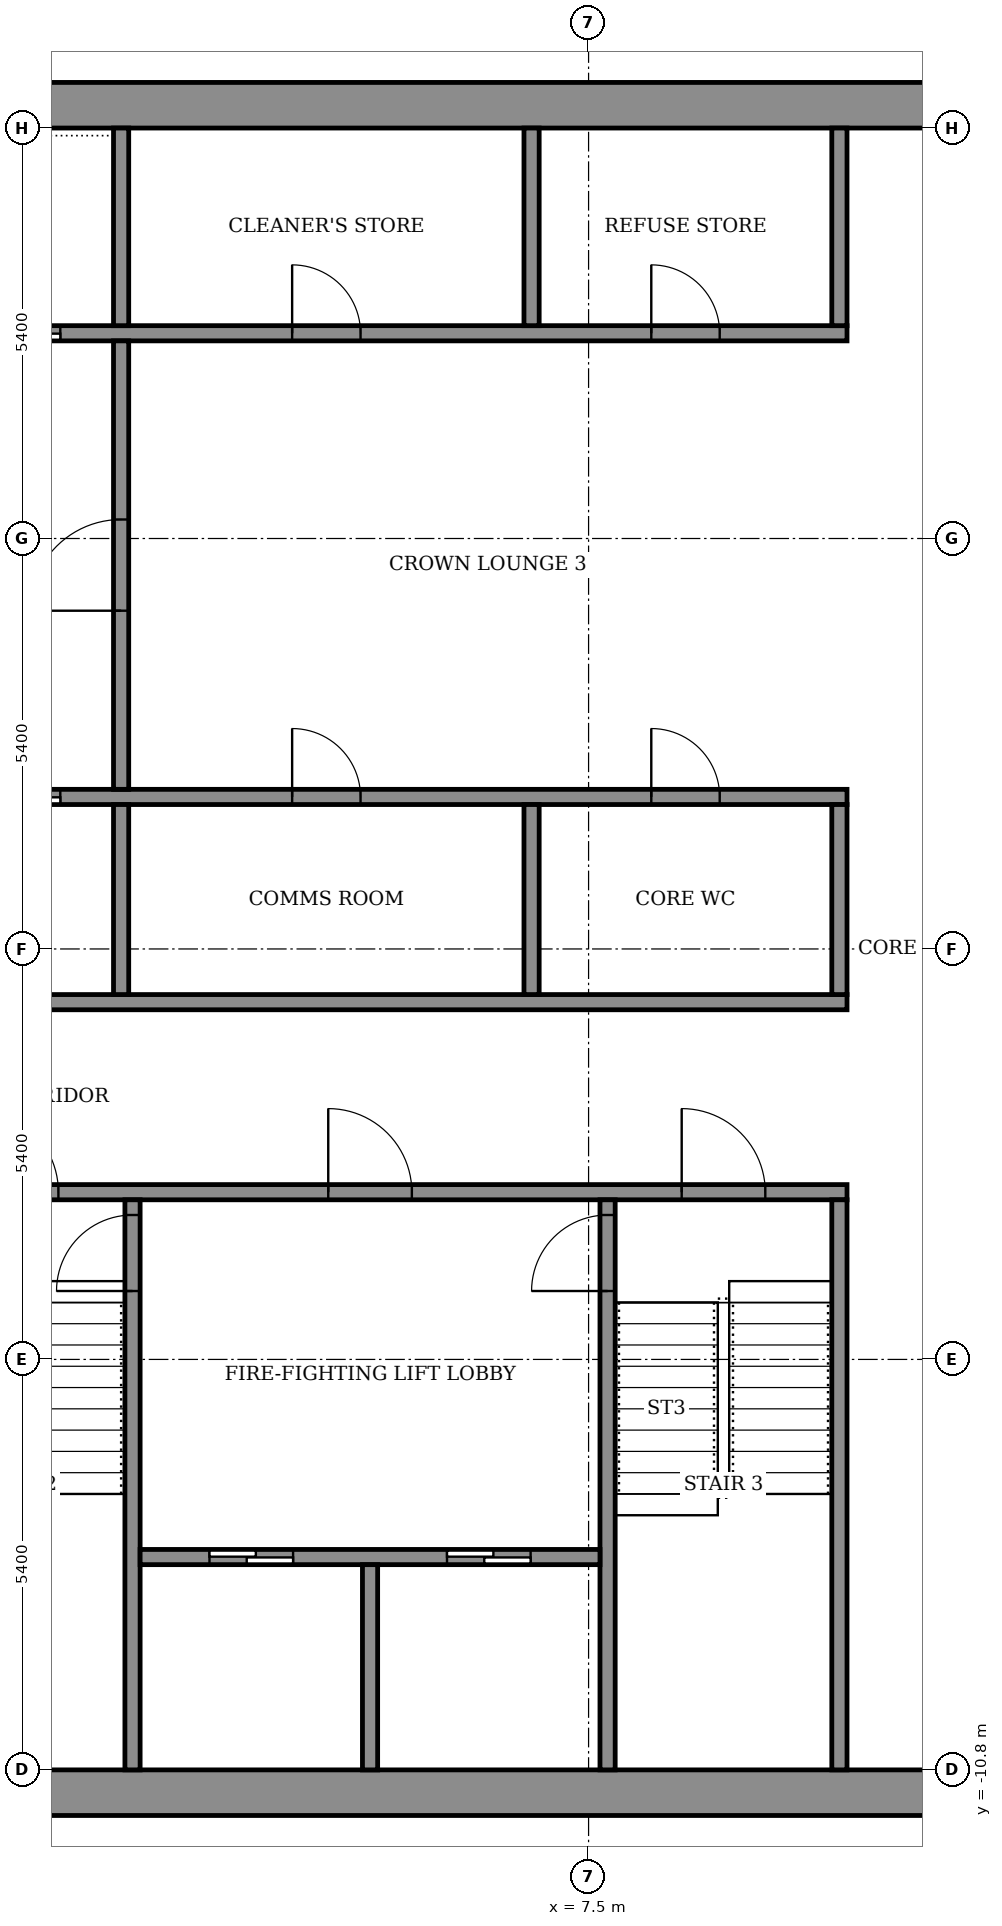
"""IFC4 building model, lengths in metres.
Left out: names, types, materials, properties, quantities, classifications, styles, units other than length and angle.
Written with IfcOpenShell. Run it as: python <this file> out.ifc"""

import sys

from ifc_helpers import new_model, si_unit, direction, frame, frame_2d, origin, place, context, subcontext, project, spatial, rectangle, extrude, element, fill, save


model = new_model("IFC4")
c1 = context("Model", 3, precision=1e-05, world=origin(), true_north=direction((0.0, 1.0)))
c2 = subcontext(c1, "Body", "Model", "MODEL_VIEW")
j1 = project(units=[si_unit("LENGTHUNIT", "METRE"), si_unit("PLANEANGLEUNIT", "RADIAN")], contexts=[c1])
p1 = place(None, origin())
s1 = spatial("IfcSite", under=j1, at=p1, CompositionType="ELEMENT")
p2 = place(p1, origin())
s2 = spatial("IfcBuilding", under=s1, at=p2, CompositionType="ELEMENT")
p3 = place(p2, frame((0.0, 0.0, 334.3)))
s3 = spatial("IfcBuildingStorey", under=s2, at=p3, CompositionType="ELEMENT", Elevation=334.3)
for number, where, z_axis, x_axis in (
    (1, (-14.4, -11.1, 0.0), (0.0, 0.0, 1.0), (1.0, 0.0, 0.0)),
    (2, (-14.4, 11.1, 0.0), (0.0, 0.0, 1.0), (1.0, 0.0, 0.0)),
):
    element("IfcWall", number, at=place(p3, frame(where, z_axis=z_axis, x_axis=x_axis)), inside=s3, PredefinedType="SHEAR", context=c2, shape_type="SweptSolid", body=[
        extrude(rectangle(XDim=28.8, YDim=0.6, at=frame_2d((14.4, 0.0))), origin(), (0.0, 0.0, 1.0), 3.6),
    ])
p4 = place(p3, frame((-10.9, -3.2, 0.0), z_axis=(0.0, 0.0, 1.0), x_axis=(1.0, 0.0, 0.0)))
e3 = element("IfcWall", 3, at=p4, inside=s3, PredefinedType="SHEAR", context=c2, shape_type="SweptSolid", body=[
    extrude(rectangle(XDim=21.8, YDim=0.2, at=frame_2d((10.9, 0.0))), origin(), (0.0, 0.0, 1.0), 3.05),
])
p5 = place(p4, frame((1.075, 0.0, 0.0)))
e4 = element("IfcOpeningElement", 4, at=p5, cuts=e3, PredefinedType="OPENING", context=c2, shape_type="SweptSolid", body=[
    extrude(rectangle(XDim=1.1, YDim=2.1, at=frame_2d((0.55, 1.05))), frame((0.0, 0.11, 0.0), z_axis=(0.0, -1.0, 0.0), x_axis=(1.0, 0.0, 0.0)), (0.0, 0.0, 1.0), 0.22),
])
p6 = place(p4, frame((10.325, 0.0, 0.0)))
e5 = element("IfcOpeningElement", 5, at=p6, cuts=e3, PredefinedType="OPENING", context=c2, shape_type="SweptSolid", body=[
    extrude(rectangle(XDim=1.1, YDim=2.1, at=frame_2d((0.55, 1.05))), frame((0.0, 0.11, 0.0), z_axis=(0.0, -1.0, 0.0), x_axis=(1.0, 0.0, 0.0)), (0.0, 0.0, 1.0), 0.22),
])
p7 = place(p4, frame((19.625, 0.0, 0.0)))
e6 = element("IfcOpeningElement", 6, at=p7, cuts=e3, PredefinedType="OPENING", context=c2, shape_type="SweptSolid", body=[
    extrude(rectangle(XDim=1.1, YDim=2.1, at=frame_2d((0.55, 1.05))), frame((0.0, 0.11, 0.0), z_axis=(0.0, -1.0, 0.0), x_axis=(1.0, 0.0, 0.0)), (0.0, 0.0, 1.0), 0.22),
])
p8 = place(p4, frame((5.7, 0.0, 0.0)))
e7 = element("IfcOpeningElement", 7, at=p8, cuts=e3, PredefinedType="OPENING", context=c2, shape_type="SweptSolid", body=[
    extrude(rectangle(XDim=1.1, YDim=2.1, at=frame_2d((0.55, 1.05))), frame((0.0, 0.11, 0.0), z_axis=(0.0, -1.0, 0.0), x_axis=(1.0, 0.0, 0.0)), (0.0, 0.0, 1.0), 0.22),
])
p9 = place(p4, frame((14.975, 0.0, 0.0)))
e8 = element("IfcOpeningElement", 8, at=p9, cuts=e3, PredefinedType="OPENING", context=c2, shape_type="SweptSolid", body=[
    extrude(rectangle(XDim=1.1, YDim=2.1, at=frame_2d((0.55, 1.05))), frame((0.0, 0.11, 0.0), z_axis=(0.0, -1.0, 0.0), x_axis=(1.0, 0.0, 0.0)), (0.0, 0.0, 1.0), 0.22),
])
p10 = place(p3, frame((-10.9, -0.7, 0.0), z_axis=(0.0, 0.0, 1.0), x_axis=(1.0, 0.0, 0.0)))
e9 = element("IfcWall", 9, at=p10, inside=s3, PredefinedType="SHEAR", context=c2, shape_type="SweptSolid", body=[
    extrude(rectangle(XDim=21.8, YDim=0.2, at=frame_2d((10.9, 0.0))), origin(), (0.0, 0.0, 1.0), 3.05),
])
p11 = place(p3, frame((-10.9, 2.0, 0.0), z_axis=(0.0, 0.0, 1.0), x_axis=(1.0, 0.0, 0.0)))
e10 = element("IfcWall", 10, at=p11, inside=s3, PredefinedType="SHEAR", context=c2, shape_type="SweptSolid", body=[
    extrude(rectangle(XDim=21.8, YDim=0.2, at=frame_2d((10.9, 0.0))), origin(), (0.0, 0.0, 1.0), 3.05),
])
p12 = place(p11, frame((4.95, 0.0, 0.0)))
e11 = element("IfcOpeningElement", 11, at=p12, cuts=e10, PredefinedType="OPENING", context=c2, shape_type="SweptSolid", body=[
    extrude(rectangle(XDim=1.1, YDim=2.1, at=frame_2d((0.55, 1.05))), frame((0.0, 0.11, 0.0), z_axis=(0.0, -1.0, 0.0), x_axis=(1.0, 0.0, 0.0)), (0.0, 0.0, 1.0), 0.22),
])
p13 = place(p11, frame((7.65, 0.0, 0.0)))
e12 = element("IfcOpeningElement", 12, at=p13, cuts=e10, PredefinedType="OPENING", context=c2, shape_type="SweptSolid", body=[
    extrude(rectangle(XDim=1.1, YDim=2.1, at=frame_2d((0.55, 1.05))), frame((0.0, 0.11, 0.0), z_axis=(0.0, -1.0, 0.0), x_axis=(1.0, 0.0, 0.0)), (0.0, 0.0, 1.0), 0.22),
])
p14 = place(p11, frame((10.35, 0.0, 0.0)))
e13 = element("IfcOpeningElement", 13, at=p14, cuts=e10, PredefinedType="OPENING", context=c2, shape_type="SweptSolid", body=[
    extrude(rectangle(XDim=1.1, YDim=2.1, at=frame_2d((0.55, 1.05))), frame((0.0, 0.11, 0.0), z_axis=(0.0, -1.0, 0.0), x_axis=(1.0, 0.0, 0.0)), (0.0, 0.0, 1.0), 0.22),
])
p15 = place(p11, frame((1.675, 0.0, 0.0)))
e14 = element("IfcOpeningElement", 14, at=p15, cuts=e10, PredefinedType="OPENING", context=c2, shape_type="SweptSolid", body=[
    extrude(rectangle(XDim=0.9, YDim=2.1, at=frame_2d((0.45, 1.05))), frame((0.0, 0.11, 0.0), z_axis=(0.0, -1.0, 0.0), x_axis=(1.0, 0.0, 0.0)), (0.0, 0.0, 1.0), 0.22),
])
p16 = place(p11, frame((14.5, 0.0, 0.0)))
e15 = element("IfcOpeningElement", 15, at=p16, cuts=e10, PredefinedType="OPENING", context=c2, shape_type="SweptSolid", body=[
    extrude(rectangle(XDim=0.9, YDim=2.1, at=frame_2d((0.45, 1.05))), frame((0.0, 0.11, 0.0), z_axis=(0.0, -1.0, 0.0), x_axis=(1.0, 0.0, 0.0)), (0.0, 0.0, 1.0), 0.22),
])
p17 = place(p11, frame((19.225, 0.0, 0.0)))
e16 = element("IfcOpeningElement", 16, at=p17, cuts=e10, PredefinedType="OPENING", context=c2, shape_type="SweptSolid", body=[
    extrude(rectangle(XDim=0.9, YDim=2.1, at=frame_2d((0.45, 1.05))), frame((0.0, 0.11, 0.0), z_axis=(0.0, -1.0, 0.0), x_axis=(1.0, 0.0, 0.0)), (0.0, 0.0, 1.0), 0.22),
])
p18 = place(p3, frame((-10.9, 8.1, 0.0), z_axis=(0.0, 0.0, 1.0), x_axis=(1.0, 0.0, 0.0)))
e17 = element("IfcWall", 17, at=p18, inside=s3, PredefinedType="SHEAR", context=c2, shape_type="SweptSolid", body=[
    extrude(rectangle(XDim=21.8, YDim=0.2, at=frame_2d((10.9, 0.0))), origin(), (0.0, 0.0, 1.0), 3.05),
])
p19 = place(p18, frame((4.95, 0.0, 0.0)))
e18 = element("IfcOpeningElement", 18, at=p19, cuts=e17, PredefinedType="OPENING", context=c2, shape_type="SweptSolid", body=[
    extrude(rectangle(XDim=1.1, YDim=2.1, at=frame_2d((0.55, 1.05))), frame((0.0, 0.11, 0.0), z_axis=(0.0, -1.0, 0.0), x_axis=(1.0, 0.0, 0.0)), (0.0, 0.0, 1.0), 0.22),
])
p20 = place(p18, frame((7.65, 0.0, 0.0)))
e19 = element("IfcOpeningElement", 19, at=p20, cuts=e17, PredefinedType="OPENING", context=c2, shape_type="SweptSolid", body=[
    extrude(rectangle(XDim=1.1, YDim=2.1, at=frame_2d((0.55, 1.05))), frame((0.0, 0.11, 0.0), z_axis=(0.0, -1.0, 0.0), x_axis=(1.0, 0.0, 0.0)), (0.0, 0.0, 1.0), 0.22),
])
p21 = place(p18, frame((10.35, 0.0, 0.0)))
e20 = element("IfcOpeningElement", 20, at=p21, cuts=e17, PredefinedType="OPENING", context=c2, shape_type="SweptSolid", body=[
    extrude(rectangle(XDim=1.1, YDim=2.1, at=frame_2d((0.55, 1.05))), frame((0.0, 0.11, 0.0), z_axis=(0.0, -1.0, 0.0), x_axis=(1.0, 0.0, 0.0)), (0.0, 0.0, 1.0), 0.22),
])
p22 = place(p18, frame((1.675, 0.0, 0.0)))
e21 = element("IfcOpeningElement", 21, at=p22, cuts=e17, PredefinedType="OPENING", context=c2, shape_type="SweptSolid", body=[
    extrude(rectangle(XDim=0.9, YDim=2.1, at=frame_2d((0.45, 1.05))), frame((0.0, 0.11, 0.0), z_axis=(0.0, -1.0, 0.0), x_axis=(1.0, 0.0, 0.0)), (0.0, 0.0, 1.0), 0.22),
])
p23 = place(p18, frame((14.5, 0.0, 0.0)))
e22 = element("IfcOpeningElement", 22, at=p23, cuts=e17, PredefinedType="OPENING", context=c2, shape_type="SweptSolid", body=[
    extrude(rectangle(XDim=0.9, YDim=2.1, at=frame_2d((0.45, 1.05))), frame((0.0, 0.11, 0.0), z_axis=(0.0, -1.0, 0.0), x_axis=(1.0, 0.0, 0.0)), (0.0, 0.0, 1.0), 0.22),
])
p24 = place(p18, frame((19.225, 0.0, 0.0)))
e23 = element("IfcOpeningElement", 23, at=p24, cuts=e17, PredefinedType="OPENING", context=c2, shape_type="SweptSolid", body=[
    extrude(rectangle(XDim=0.9, YDim=2.1, at=frame_2d((0.45, 1.05))), frame((0.0, 0.11, 0.0), z_axis=(0.0, -1.0, 0.0), x_axis=(1.0, 0.0, 0.0)), (0.0, 0.0, 1.0), 0.22),
])
p25 = place(p3, frame((1.5, -10.8, 0.0), z_axis=(0.0, 0.0, 1.0), x_axis=(0.0, 1.0, 0.0)))
e24 = element("IfcWall", 24, at=p25, inside=s3, PredefinedType="SHEAR", context=c2, shape_type="SweptSolid", body=[
    extrude(rectangle(XDim=7.5, YDim=0.2, at=frame_2d((3.75, 0.0))), origin(), (0.0, 0.0, 1.0), 3.05),
])
p26 = place(p25, frame((6.3, 0.0, 0.0)))
e25 = element("IfcOpeningElement", 25, at=p26, cuts=e24, PredefinedType="OPENING", context=c2, shape_type="SweptSolid", body=[
    extrude(rectangle(XDim=1.0, YDim=2.1, at=frame_2d((0.5, 1.05))), frame((0.0, 0.11, 0.0), z_axis=(0.0, -1.0, 0.0), x_axis=(1.0, 0.0, 0.0)), (0.0, 0.0, 1.0), 0.22),
])
p27 = place(p3, frame((7.75, -10.8, 0.0), z_axis=(0.0, 0.0, 1.0), x_axis=(0.0, 1.0, 0.0)))
e26 = element("IfcWall", 26, at=p27, inside=s3, PredefinedType="SHEAR", context=c2, shape_type="SweptSolid", body=[
    extrude(rectangle(XDim=7.5, YDim=0.2, at=frame_2d((3.75, 0.0))), origin(), (0.0, 0.0, 1.0), 3.05),
])
p28 = place(p27, frame((6.3, 0.0, 0.0)))
e27 = element("IfcOpeningElement", 27, at=p28, cuts=e26, PredefinedType="OPENING", context=c2, shape_type="SweptSolid", body=[
    extrude(rectangle(XDim=1.0, YDim=2.1, at=frame_2d((0.5, 1.05))), frame((0.0, 0.11, 0.0), z_axis=(0.0, -1.0, 0.0), x_axis=(1.0, 0.0, 0.0)), (0.0, 0.0, 1.0), 0.22),
])
p29 = place(p3, frame((10.8, -10.8, 0.0), z_axis=(0.0, 0.0, 1.0), x_axis=(0.0, 1.0, 0.0)))
e28 = element("IfcWall", 28, at=p29, inside=s3, PredefinedType="SHEAR", context=c2, shape_type="SweptSolid", body=[
    extrude(rectangle(XDim=7.5, YDim=0.2, at=frame_2d((3.75, 0.0))), origin(), (0.0, 0.0, 1.0), 3.05),
])
p30 = place(p3, frame((1.6, -8.0, 0.0), z_axis=(0.0, 0.0, 1.0), x_axis=(1.0, 0.0, 0.0)))
e29 = element("IfcWall", 29, at=p30, inside=s3, PredefinedType="SHEAR", context=c2, shape_type="SweptSolid", body=[
    extrude(rectangle(XDim=6.05, YDim=0.2, at=frame_2d((3.025, 0.0))), origin(), (0.0, 0.0, 1.0), 3.05),
])
p31 = place(p30, frame((0.913, 0.0, 0.0)))
e30 = element("IfcOpeningElement", 30, at=p31, cuts=e29, PredefinedType="OPENING", context=c2, shape_type="SweptSolid", body=[
    extrude(rectangle(XDim=1.1, YDim=2.1, at=frame_2d((0.55, 1.05))), frame((0.0, 0.11, 0.0), z_axis=(0.0, -1.0, 0.0), x_axis=(1.0, 0.0, 0.0)), (0.0, 0.0, 1.0), 0.22),
])
p32 = place(p30, frame((4.038, 0.0, 0.0)))
e31 = element("IfcOpeningElement", 31, at=p32, cuts=e29, PredefinedType="OPENING", context=c2, shape_type="SweptSolid", body=[
    extrude(rectangle(XDim=1.1, YDim=2.1, at=frame_2d((0.55, 1.05))), frame((0.0, 0.11, 0.0), z_axis=(0.0, -1.0, 0.0), x_axis=(1.0, 0.0, 0.0)), (0.0, 0.0, 1.0), 0.22),
])
p33 = place(p3, frame((4.625, -10.8, 0.0), z_axis=(0.0, 0.0, 1.0), x_axis=(0.0, 1.0, 0.0)))
e32 = element("IfcWall", 32, at=p33, inside=s3, PredefinedType="SHEAR", context=c2, shape_type="SweptSolid", body=[
    extrude(rectangle(XDim=2.7, YDim=0.2, at=frame_2d((1.35, 0.0))), origin(), (0.0, 0.0, 1.0), 3.05),
])
p34 = place(p3, frame((1.35, -0.6, 0.0), z_axis=(0.0, 0.0, 1.0), x_axis=(0.0, 1.0, 0.0)))
e33 = element("IfcWall", 33, at=p34, inside=s3, PredefinedType="SHEAR", context=c2, shape_type="SweptSolid", body=[
    extrude(rectangle(XDim=2.5, YDim=0.2, at=frame_2d((1.25, 0.0))), origin(), (0.0, 0.0, 1.0), 3.05),
])
for number, where, z_axis, x_axis in (
    (34, (6.75, -0.6, 0.0), (0.0, 0.0, 1.0), (0.0, 1.0, 0.0)),
    (35, (10.8, -0.6, 0.0), (0.0, 0.0, 1.0), (0.0, 1.0, 0.0)),
):
    element("IfcWall", number, at=place(p3, frame(where, z_axis=z_axis, x_axis=x_axis)), inside=s3, PredefinedType="STANDARD", context=c2, shape_type="SweptSolid", body=[
        extrude(rectangle(XDim=2.5, YDim=0.2, at=frame_2d((1.25, 0.0))), origin(), (0.0, 0.0, 1.0), 3.05),
    ])
p35 = place(p3, frame((1.35, 8.2, 0.0), z_axis=(0.0, 0.0, 1.0), x_axis=(0.0, 1.0, 0.0)))
e36 = element("IfcWall", 36, at=p35, inside=s3, PredefinedType="SHEAR", context=c2, shape_type="SweptSolid", body=[
    extrude(rectangle(XDim=2.6, YDim=0.2, at=frame_2d((1.3, 0.0))), origin(), (0.0, 0.0, 1.0), 3.05),
])
for number, where, z_axis, x_axis in (
    (37, (6.75, 8.2, 0.0), (0.0, 0.0, 1.0), (0.0, 1.0, 0.0)),
    (38, (10.8, 8.2, 0.0), (0.0, 0.0, 1.0), (0.0, 1.0, 0.0)),
):
    element("IfcWall", number, at=place(p3, frame(where, z_axis=z_axis, x_axis=x_axis)), inside=s3, PredefinedType="STANDARD", context=c2, shape_type="SweptSolid", body=[
        extrude(rectangle(XDim=2.6, YDim=0.2, at=frame_2d((1.3, 0.0))), origin(), (0.0, 0.0, 1.0), 3.05),
    ])
p36 = place(p3, frame((1.35, 2.1, 0.0), z_axis=(0.0, 0.0, 1.0), x_axis=(0.0, 1.0, 0.0)))
e39 = element("IfcWall", 39, at=p36, inside=s3, PredefinedType="STANDARD", context=c2, shape_type="SweptSolid", body=[
    extrude(rectangle(XDim=5.9, YDim=0.2, at=frame_2d((2.95, 0.0))), origin(), (0.0, 0.0, 1.0), 3.05),
])
p37 = place(p36, frame((2.35, 0.0, 0.0)))
e40 = element("IfcOpeningElement", 40, at=p37, cuts=e39, PredefinedType="OPENING", context=c2, shape_type="SweptSolid", body=[
    extrude(rectangle(XDim=1.2, YDim=2.1, at=frame_2d((0.6, 1.05))), frame((0.0, 0.11, 0.0), z_axis=(0.0, -1.0, 0.0), x_axis=(1.0, 0.0, 0.0)), (0.0, 0.0, 1.0), 0.22),
])
p38 = place(p14, origin())
e41 = element("IfcDoor", 41, at=p38, inside=s3, OperationType="SLIDING_TO_LEFT", PredefinedType="DOOR", context=c2, shape_type="SweptSolid", body=[
    extrude(rectangle(XDim=1.1, YDim=2.1, at=frame_2d((0.55, 1.05))), frame((0.0, 0.025, 0.0), z_axis=(0.0, -1.0, 0.0), x_axis=(1.0, 0.0, 0.0)), (0.0, 0.0, 1.0), 0.05),
])
fill(e13, e41)
p39 = place(p21, origin())
e42 = element("IfcDoor", 42, at=p39, inside=s3, OperationType="SLIDING_TO_LEFT", PredefinedType="DOOR", context=c2, shape_type="SweptSolid", body=[
    extrude(rectangle(XDim=1.1, YDim=2.1, at=frame_2d((0.55, 1.05))), frame((0.0, 0.025, 0.0), z_axis=(0.0, -1.0, 0.0), x_axis=(1.0, 0.0, 0.0)), (0.0, 0.0, 1.0), 0.05),
])
fill(e20, e42)
p40 = place(p16, origin())
e43 = element("IfcDoor", 43, at=p40, inside=s3, OperationType="SINGLE_SWING_LEFT", PredefinedType="DOOR", context=c2, shape_type="SweptSolid", body=[
    extrude(rectangle(XDim=0.9, YDim=2.1, at=frame_2d((0.45, 1.05))), frame((0.0, 0.025, 0.0), z_axis=(0.0, -1.0, 0.0), x_axis=(1.0, 0.0, 0.0)), (0.0, 0.0, 1.0), 0.05),
])
fill(e15, e43)
p41 = place(p17, origin())
e44 = element("IfcDoor", 44, at=p41, inside=s3, OperationType="SINGLE_SWING_RIGHT", PredefinedType="DOOR", context=c2, shape_type="SweptSolid", body=[
    extrude(rectangle(XDim=0.9, YDim=2.1, at=frame_2d((0.45, 1.05))), frame((0.0, 0.025, 0.0), z_axis=(0.0, -1.0, 0.0), x_axis=(1.0, 0.0, 0.0)), (0.0, 0.0, 1.0), 0.05),
])
fill(e16, e44)
p42 = place(p23, origin())
e45 = element("IfcDoor", 45, at=p42, inside=s3, OperationType="SINGLE_SWING_RIGHT", PredefinedType="DOOR", context=c2, shape_type="SweptSolid", body=[
    extrude(rectangle(XDim=0.9, YDim=2.1, at=frame_2d((0.45, 1.05))), frame((0.0, 0.025, 0.0), z_axis=(0.0, -1.0, 0.0), x_axis=(1.0, 0.0, 0.0)), (0.0, 0.0, 1.0), 0.05),
])
fill(e22, e45)
p43 = place(p24, origin())
e46 = element("IfcDoor", 46, at=p43, inside=s3, OperationType="SINGLE_SWING_RIGHT", PredefinedType="DOOR", context=c2, shape_type="SweptSolid", body=[
    extrude(rectangle(XDim=0.9, YDim=2.1, at=frame_2d((0.45, 1.05))), frame((0.0, 0.025, 0.0), z_axis=(0.0, -1.0, 0.0), x_axis=(1.0, 0.0, 0.0)), (0.0, 0.0, 1.0), 0.05),
])
fill(e23, e46)
p44 = place(p31, origin())
e47 = element("IfcDoor", 47, at=p44, inside=s3, OperationType="SLIDING_TO_LEFT", PredefinedType="DOOR", context=c2, shape_type="SweptSolid", body=[
    extrude(rectangle(XDim=1.1, YDim=2.1, at=frame_2d((0.55, 1.05))), frame((0.0, 0.025, 0.0), z_axis=(0.0, -1.0, 0.0), x_axis=(1.0, 0.0, 0.0)), (0.0, 0.0, 1.0), 0.05),
])
fill(e30, e47)
p45 = place(p32, origin())
e48 = element("IfcDoor", 48, at=p45, inside=s3, OperationType="SLIDING_TO_LEFT", PredefinedType="DOOR", context=c2, shape_type="SweptSolid", body=[
    extrude(rectangle(XDim=1.1, YDim=2.1, at=frame_2d((0.55, 1.05))), frame((0.0, 0.025, 0.0), z_axis=(0.0, -1.0, 0.0), x_axis=(1.0, 0.0, 0.0)), (0.0, 0.0, 1.0), 0.05),
])
fill(e31, e48)
p46 = place(p6, origin())
e49 = element("IfcDoor", 49, at=p46, inside=s3, OperationType="SINGLE_SWING_RIGHT", PredefinedType="DOOR", context=c2, shape_type="SweptSolid", body=[
    extrude(rectangle(XDim=1.1, YDim=2.1, at=frame_2d((0.55, 1.05))), frame((0.0, 0.025, 0.0), z_axis=(0.0, -1.0, 0.0), x_axis=(1.0, 0.0, 0.0)), (0.0, 0.0, 1.0), 0.05),
])
fill(e5, e49)
p47 = place(p7, origin())
e50 = element("IfcDoor", 50, at=p47, inside=s3, OperationType="SINGLE_SWING_RIGHT", PredefinedType="DOOR", context=c2, shape_type="SweptSolid", body=[
    extrude(rectangle(XDim=1.1, YDim=2.1, at=frame_2d((0.55, 1.05))), frame((0.0, 0.025, 0.0), z_axis=(0.0, -1.0, 0.0), x_axis=(1.0, 0.0, 0.0)), (0.0, 0.0, 1.0), 0.05),
])
fill(e6, e50)
p48 = place(p9, origin())
e51 = element("IfcDoor", 51, at=p48, inside=s3, OperationType="SINGLE_SWING_LEFT", PredefinedType="DOOR", context=c2, shape_type="SweptSolid", body=[
    extrude(rectangle(XDim=1.1, YDim=2.1, at=frame_2d((0.55, 1.05))), frame((0.0, 0.025, 0.0), z_axis=(0.0, -1.0, 0.0), x_axis=(1.0, 0.0, 0.0)), (0.0, 0.0, 1.0), 0.05),
])
fill(e8, e51)
p49 = place(p26, origin())
e52 = element("IfcDoor", 52, at=p49, inside=s3, OperationType="SINGLE_SWING_RIGHT", PredefinedType="DOOR", context=c2, shape_type="SweptSolid", body=[
    extrude(rectangle(XDim=1.0, YDim=2.1, at=frame_2d((0.5, 1.05))), frame((0.0, 0.025, 0.0), z_axis=(0.0, -1.0, 0.0), x_axis=(1.0, 0.0, 0.0)), (0.0, 0.0, 1.0), 0.05),
])
fill(e25, e52)
p50 = place(p28, origin())
e53 = element("IfcDoor", 53, at=p50, inside=s3, OperationType="SINGLE_SWING_RIGHT", PredefinedType="DOOR", context=c2, shape_type="SweptSolid", body=[
    extrude(rectangle(XDim=1.0, YDim=2.1, at=frame_2d((0.5, 1.05))), frame((0.0, 0.025, 0.0), z_axis=(0.0, -1.0, 0.0), x_axis=(1.0, 0.0, 0.0)), (0.0, 0.0, 1.0), 0.05),
])
fill(e27, e53)
p51 = place(p37, origin())
e54 = element("IfcDoor", 54, at=p51, inside=s3, OperationType="SINGLE_SWING_LEFT", PredefinedType="DOOR", context=c2, shape_type="SweptSolid", body=[
    extrude(rectangle(XDim=1.2, YDim=2.1, at=frame_2d((0.6, 1.05))), frame((0.0, 0.025, 0.0), z_axis=(0.0, -1.0, 0.0), x_axis=(1.0, 0.0, 0.0)), (0.0, 0.0, 1.0), 0.05),
])
fill(e40, e54)
save(model, sys.argv[1])
